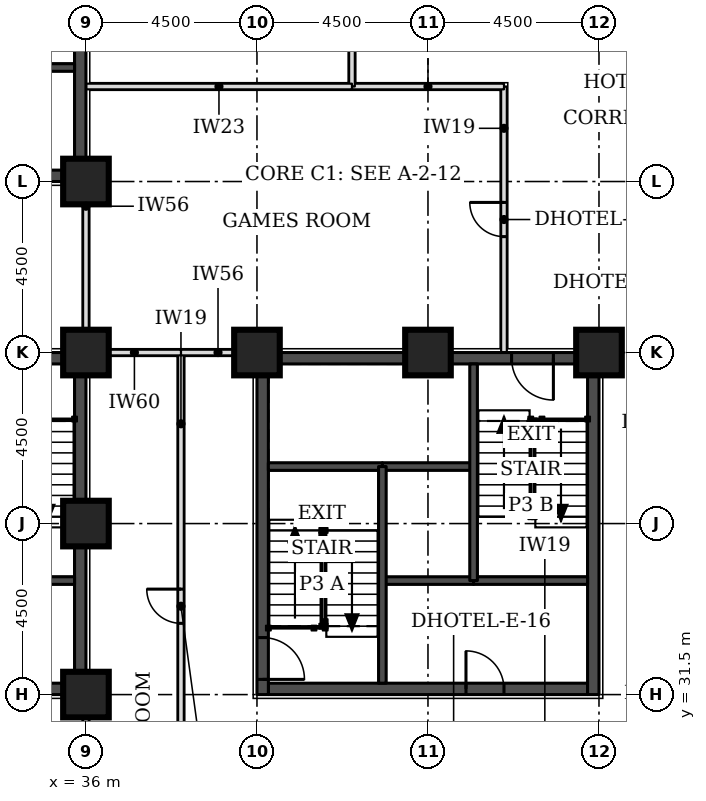
"""IFC4 building model, lengths in metres.
Left out: names, types, materials, properties, quantities, classifications, styles, units other than length and angle.
Written with IfcOpenShell. Run it as: python <this file> out.ifc"""

import sys

from ifc_helpers import new_model, si_unit, direction, frame, frame_2d, origin, origin_2d, place, context, subcontext, project, spatial, rectangle, extrude, element, fill, save


model = new_model("IFC4")
c1 = context("Model", 3, precision=1e-05, world=origin(), true_north=direction((0.0, 1.0)))
c2 = subcontext(c1, "Body", "Model", "MODEL_VIEW")
j1 = project(units=[si_unit("LENGTHUNIT", "METRE"), si_unit("PLANEANGLEUNIT", "RADIAN")], contexts=[c1])
p1 = place(None, origin())
s1 = spatial("IfcSite", under=j1, at=p1, CompositionType="ELEMENT")
p2 = place(p1, origin())
s2 = spatial("IfcBuilding", under=s1, at=p2, CompositionType="ELEMENT")
p3 = place(p2, frame((0.0, 0.0, 39.6)))
s3 = spatial("IfcBuildingStorey", under=s2, at=p3, CompositionType="ELEMENT", Elevation=39.6)
for number, where, z_axis, x_axis in (
    (1, (36.0, 31.5, 0.0), (0.0, 0.0, 1.0), (1.0, 0.0, 0.0)),
    (2, (36.0, 36.0, 0.0), (0.0, 0.0, 1.0), (1.0, 0.0, 0.0)),
    (3, (36.0, 40.5, 0.0), (0.0, 0.0, 1.0), (1.0, 0.0, 0.0)),
    (4, (40.5, 40.5, 0.0), (0.0, 0.0, 1.0), (1.0, 0.0, 0.0)),
    (5, (45.0, 40.5, 0.0), (0.0, 0.0, 1.0), (1.0, 0.0, 0.0)),
    (6, (49.5, 40.5, 0.0), (0.0, 0.0, 1.0), (1.0, 0.0, 0.0)),
    (7, (36.0, 45.0, 0.0), (0.0, 0.0, 1.0), (1.0, 0.0, 0.0)),
):
    element("IfcColumn", number, at=place(p3, frame(where, z_axis=z_axis, x_axis=x_axis)), inside=s3, PredefinedType="COLUMN", context=c2, shape_type="SweptSolid", body=[
        extrude(rectangle(XDim=1.2, YDim=1.2, at=origin_2d()), origin(), (0.0, 0.0, 1.0), 3.3),
    ])
p4 = place(p3, frame((27.3, 45.15, 0.0), z_axis=(0.0, 0.0, 1.0), x_axis=(1.0, 0.0, 0.0)))
e8 = element("IfcWall", 8, at=p4, inside=s3, PredefinedType="SHEAR", context=c2, shape_type="SweptSolid", body=[
    extrude(rectangle(XDim=8.4, YDim=0.3, at=frame_2d((4.2, 0.0))), origin(), (0.0, 0.0, 1.0), 3.3),
])
p5 = place(p4, frame((5.2, 0.0, 0.0)))
e9 = element("IfcOpeningElement", 9, at=p5, cuts=e8, PredefinedType="OPENING", context=c2, shape_type="SweptSolid", body=[
    extrude(rectangle(XDim=1.0, YDim=2.1, at=frame_2d((0.5, 1.05))), frame((0.0, 0.16, 0.0), z_axis=(0.0, -1.0, 0.0), x_axis=(1.0, 0.0, 0.0)), (0.0, 0.0, 1.0), 0.32),
])
p6 = place(p3, frame((35.85, 45.0, 0.0), z_axis=(0.0, 0.0, 1.0), x_axis=(0.0, 1.0, 0.0)))
e10 = element("IfcWall", 10, at=p6, inside=s3, PredefinedType="SHEAR", context=c2, shape_type="SweptSolid", body=[
    extrude(rectangle(XDim=9.0, YDim=0.3, at=frame_2d((4.5, 0.0))), origin(), (0.0, 0.0, 1.0), 3.3),
])
p7 = place(p3, frame((40.8, 31.65, 0.0), z_axis=(0.0, 0.0, 1.0), x_axis=(1.0, 0.0, 0.0)))
e11 = element("IfcWall", 11, at=p7, inside=s3, PredefinedType="SHEAR", context=c2, shape_type="SweptSolid", body=[
    extrude(rectangle(XDim=8.4, YDim=0.3, at=frame_2d((4.2, 0.0))), origin(), (0.0, 0.0, 1.0), 3.3),
])
p8 = place(p7, frame((5.2, 0.0, 0.0)))
e12 = element("IfcOpeningElement", 12, at=p8, cuts=e11, PredefinedType="OPENING", context=c2, shape_type="SweptSolid", body=[
    extrude(rectangle(XDim=1.0, YDim=2.1, at=frame_2d((0.5, 1.05))), frame((0.0, 0.16, 0.0), z_axis=(0.0, -1.0, 0.0), x_axis=(1.0, 0.0, 0.0)), (0.0, 0.0, 1.0), 0.32),
])
p9 = place(p3, frame((40.8, 40.35, 0.0), z_axis=(0.0, 0.0, 1.0), x_axis=(1.0, 0.0, 0.0)))
e13 = element("IfcWall", 13, at=p9, inside=s3, PredefinedType="SHEAR", context=c2, shape_type="SweptSolid", body=[
    extrude(rectangle(XDim=8.4, YDim=0.3, at=frame_2d((4.2, 0.0))), origin(), (0.0, 0.0, 1.0), 3.3),
])
p10 = place(p9, frame((6.4, 0.0, 0.0)))
e14 = element("IfcOpeningElement", 14, at=p10, cuts=e13, PredefinedType="OPENING", context=c2, shape_type="SweptSolid", body=[
    extrude(rectangle(XDim=1.1, YDim=2.1, at=frame_2d((0.55, 1.05))), frame((0.0, 0.16, 0.0), z_axis=(0.0, -1.0, 0.0), x_axis=(1.0, 0.0, 0.0)), (0.0, 0.0, 1.0), 0.32),
])
p11 = place(p3, frame((40.65, 31.5, 0.0), z_axis=(0.0, 0.0, 1.0), x_axis=(0.0, 1.0, 0.0)))
e15 = element("IfcWall", 15, at=p11, inside=s3, PredefinedType="SHEAR", context=c2, shape_type="SweptSolid", body=[
    extrude(rectangle(XDim=9.0, YDim=0.3, at=frame_2d((4.5, 0.0))), origin(), (0.0, 0.0, 1.0), 3.3),
])
p12 = place(p11, frame((0.4, 0.0, 0.0)))
e16 = element("IfcOpeningElement", 16, at=p12, cuts=e15, PredefinedType="OPENING", context=c2, shape_type="SweptSolid", body=[
    extrude(rectangle(XDim=1.1, YDim=2.1, at=frame_2d((0.55, 1.05))), frame((0.0, 0.16, 0.0), z_axis=(0.0, -1.0, 0.0), x_axis=(1.0, 0.0, 0.0)), (0.0, 0.0, 1.0), 0.32),
])
p13 = place(p3, frame((49.35, 31.5, 0.0), z_axis=(0.0, 0.0, 1.0), x_axis=(0.0, 1.0, 0.0)))
e17 = element("IfcWall", 17, at=p13, inside=s3, PredefinedType="SHEAR", context=c2, shape_type="SweptSolid", body=[
    extrude(rectangle(XDim=9.0, YDim=0.3, at=frame_2d((4.5, 0.0))), origin(), (0.0, 0.0, 1.0), 3.3),
])
p14 = place(p3, frame((27.3, 31.65, 0.0), z_axis=(0.0, 0.0, 1.0), x_axis=(1.0, 0.0, 0.0)))
e18 = element("IfcWall", 18, at=p14, inside=s3, PredefinedType="SHEAR", context=c2, shape_type="SweptSolid", body=[
    extrude(rectangle(XDim=8.4, YDim=0.3, at=frame_2d((4.2, 0.0))), origin(), (0.0, 0.0, 1.0), 3.3),
])
p15 = place(p14, frame((4.8, 0.0, 0.0)))
e19 = element("IfcOpeningElement", 19, at=p15, cuts=e18, PredefinedType="OPENING", context=c2, shape_type="SweptSolid", body=[
    extrude(rectangle(XDim=1.8, YDim=2.1, at=frame_2d((0.9, 1.05))), frame((0.0, 0.16, 0.0), z_axis=(0.0, -1.0, 0.0), x_axis=(1.0, 0.0, 0.0)), (0.0, 0.0, 1.0), 0.32),
])
p16 = place(p3, frame((27.3, 40.35, 0.0), z_axis=(0.0, 0.0, 1.0), x_axis=(1.0, 0.0, 0.0)))
e20 = element("IfcWall", 20, at=p16, inside=s3, PredefinedType="SHEAR", context=c2, shape_type="SweptSolid", body=[
    extrude(rectangle(XDim=8.4, YDim=0.3, at=frame_2d((4.2, 0.0))), origin(), (0.0, 0.0, 1.0), 3.3),
])
p17 = place(p16, frame((6.4, 0.0, 0.0)))
e21 = element("IfcOpeningElement", 21, at=p17, cuts=e20, PredefinedType="OPENING", context=c2, shape_type="SweptSolid", body=[
    extrude(rectangle(XDim=1.1, YDim=2.1, at=frame_2d((0.55, 1.05))), frame((0.0, 0.16, 0.0), z_axis=(0.0, -1.0, 0.0), x_axis=(1.0, 0.0, 0.0)), (0.0, 0.0, 1.0), 0.32),
])
p18 = place(p3, frame((35.85, 31.5, 0.0), z_axis=(0.0, 0.0, 1.0), x_axis=(0.0, 1.0, 0.0)))
e22 = element("IfcWall", 22, at=p18, inside=s3, PredefinedType="SHEAR", context=c2, shape_type="SweptSolid", body=[
    extrude(rectangle(XDim=9.0, YDim=0.3, at=frame_2d((4.5, 0.0))), origin(), (0.0, 0.0, 1.0), 3.3),
])
p19 = place(p3, frame((38.5, 27.15, 0.0), z_axis=(0.0, 0.0, 1.0), x_axis=(0.0, 1.0, 0.0)))
e23 = element("IfcWall", 23, at=p19, inside=s3, PredefinedType="PARTITIONING", context=c2, shape_type="SweptSolid", body=[
    extrude(rectangle(XDim=13.35, YDim=0.15, at=frame_2d((6.675, 0.0))), origin(), (0.0, 0.0, 1.0), 3.08),
])
p20 = place(p19, frame((6.225, 0.0, 0.0)))
e24 = element("IfcOpeningElement", 24, at=p20, cuts=e23, PredefinedType="OPENING", context=c2, shape_type="SweptSolid", body=[
    extrude(rectangle(XDim=0.9, YDim=2.1, at=frame_2d((0.45, 1.05))), frame((0.0, 0.085, 0.0), z_axis=(0.0, -1.0, 0.0), x_axis=(1.0, 0.0, 0.0)), (0.0, 0.0, 1.0), 0.17),
])
for number, where, z_axis, x_axis in (
    (25, (36.0, 29.5, 0.0), (0.0, 0.0, 1.0), (0.0, 1.0, 0.0)),
    (26, (38.5, 40.5, 0.0), (0.0, 0.0, 1.0), (1.0, 0.0, 0.0)),
):
    element("IfcWall", number, at=place(p3, frame(where, z_axis=z_axis, x_axis=x_axis)), inside=s3, PredefinedType="PARTITIONING", context=c2, shape_type="SweptSolid", body=[
        extrude(rectangle(XDim=1.95, YDim=0.15, at=frame_2d((0.975, 0.0))), origin(), (0.0, 0.0, 1.0), 2.33),
    ])
p21 = place(p3, frame((36.0, 40.55, 0.0), z_axis=(0.0, 0.0, 1.0), x_axis=(0.0, 1.0, 0.0)))
e27 = element("IfcWall", 27, at=p21, inside=s3, PredefinedType="PARTITIONING", context=c2, shape_type="SweptSolid", body=[
    extrude(rectangle(XDim=4.4, YDim=0.15, at=frame_2d((2.2, 0.0))), origin(), (0.0, 0.0, 1.0), 2.33),
])
p22 = place(p3, frame((47.0, 40.5, 0.0), z_axis=(0.0, 0.0, 1.0), x_axis=(0.0, 1.0, 0.0)))
e28 = element("IfcWall", 28, at=p22, inside=s3, PredefinedType="PARTITIONING", context=c2, shape_type="SweptSolid", body=[
    extrude(rectangle(XDim=7.0, YDim=0.15, at=frame_2d((3.5, 0.0))), origin(), (0.0, 0.0, 1.0), 3.08),
])
p23 = place(p22, frame((3.05, 0.0, 0.0)))
e29 = element("IfcOpeningElement", 29, at=p23, cuts=e28, PredefinedType="OPENING", context=c2, shape_type="SweptSolid", body=[
    extrude(rectangle(XDim=0.9, YDim=2.1, at=frame_2d((0.45, 1.05))), frame((0.0, 0.085, 0.0), z_axis=(0.0, -1.0, 0.0), x_axis=(1.0, 0.0, 0.0)), (0.0, 0.0, 1.0), 0.17),
])
p24 = place(p3, frame((43.0, 47.5, 0.0), z_axis=(0.0, 0.0, 1.0), x_axis=(1.0, 0.0, 0.0)))
e30 = element("IfcWall", 30, at=p24, inside=s3, PredefinedType="PARTITIONING", context=c2, shape_type="SweptSolid", body=[
    extrude(rectangle(XDim=4.0, YDim=0.15, at=frame_2d((2.0, 0.0))), origin(), (0.0, 0.0, 1.0), 3.08),
])
p25 = place(p3, frame((43.0, 47.5, 0.0), z_axis=(0.0, 0.0, 1.0), x_axis=(0.0, 1.0, 0.0)))
e31 = element("IfcWall", 31, at=p25, inside=s3, PredefinedType="PARTITIONING", context=c2, shape_type="SweptSolid", body=[
    extrude(rectangle(XDim=7.85, YDim=0.15, at=frame_2d((3.925, 0.0))), origin(), (0.0, 0.0, 1.0), 3.08),
])
p26 = place(p25, frame((3.475, 0.0, 0.0)))
e32 = element("IfcOpeningElement", 32, at=p26, cuts=e31, PredefinedType="OPENING", context=c2, shape_type="SweptSolid", body=[
    extrude(rectangle(XDim=0.9, YDim=2.1, at=frame_2d((0.45, 1.05))), frame((0.0, 0.085, 0.0), z_axis=(0.0, -1.0, 0.0), x_axis=(1.0, 0.0, 0.0)), (0.0, 0.0, 1.0), 0.17),
])
p27 = place(p3, frame((36.05, 40.5, 0.0), z_axis=(0.0, 0.0, 1.0), x_axis=(1.0, 0.0, 0.0)))
e33 = element("IfcWall", 33, at=p27, inside=s3, PredefinedType="PARTITIONING", context=c2, shape_type="SweptSolid", body=[
    extrude(rectangle(XDim=2.45, YDim=0.15, at=frame_2d((1.225, 0.0))), origin(), (0.0, 0.0, 1.0), 2.33),
])
p28 = place(p3, frame((36.0, 47.5, 0.0), z_axis=(0.0, 0.0, 1.0), x_axis=(1.0, 0.0, 0.0)))
e34 = element("IfcWall", 34, at=p28, inside=s3, PredefinedType="PARTITIONING", context=c2, shape_type="SweptSolid", body=[
    extrude(rectangle(XDim=7.0, YDim=0.15, at=frame_2d((3.5, 0.0))), origin(), (0.0, 0.0, 1.0), 3.08),
])
p29 = place(p3, frame((32.7, 48.0, 0.0), z_axis=(0.0, 0.0, 1.0), x_axis=(1.0, 0.0, 0.0)))
e35 = element("IfcWall", 35, at=p29, inside=s3, PredefinedType="SOLIDWALL", context=c2, shape_type="SweptSolid", body=[
    extrude(rectangle(XDim=3.0, YDim=0.2, at=frame_2d((1.5, 0.0))), origin(), (0.0, 0.0, 1.0), 3.08),
])
p30 = place(p3, frame((43.8, 34.5, 0.0), z_axis=(0.0, 0.0, 1.0), x_axis=(1.0, 0.0, 0.0)))
e36 = element("IfcWall", 36, at=p30, inside=s3, PredefinedType="SOLIDWALL", context=c2, shape_type="SweptSolid", body=[
    extrude(rectangle(XDim=2.4, YDim=0.2, at=frame_2d((1.2, 0.0))), origin(), (0.0, 0.0, 1.0), 3.08),
])
p31 = place(p3, frame((46.2, 34.5, 0.0), z_axis=(0.0, 0.0, 1.0), x_axis=(1.0, 0.0, 0.0)))
e37 = element("IfcWall", 37, at=p31, inside=s3, PredefinedType="SOLIDWALL", context=c2, shape_type="SweptSolid", body=[
    extrude(rectangle(XDim=3.0, YDim=0.2, at=frame_2d((1.5, 0.0))), origin(), (0.0, 0.0, 1.0), 3.08),
])
p32 = place(p3, frame((43.8, 37.5, 0.0), z_axis=(0.0, 0.0, 1.0), x_axis=(1.0, 0.0, 0.0)))
e38 = element("IfcWall", 38, at=p32, inside=s3, PredefinedType="SOLIDWALL", context=c2, shape_type="SweptSolid", body=[
    extrude(rectangle(XDim=2.4, YDim=0.2, at=frame_2d((1.2, 0.0))), origin(), (0.0, 0.0, 1.0), 3.3),
])
p33 = place(p3, frame((40.8, 37.5, 0.0), z_axis=(0.0, 0.0, 1.0), x_axis=(1.0, 0.0, 0.0)))
e39 = element("IfcWall", 39, at=p33, inside=s3, PredefinedType="SOLIDWALL", context=c2, shape_type="SweptSolid", body=[
    extrude(rectangle(XDim=3.0, YDim=0.2, at=frame_2d((1.5, 0.0))), origin(), (0.0, 0.0, 1.0), 3.08),
])
for number, where, z_axis, x_axis in (
    (40, (43.8, 31.8, 0.0), (0.0, 0.0, 1.0), (0.0, 1.0, 0.0)),
    (41, (46.2, 34.5, 0.0), (0.0, 0.0, 1.0), (0.0, 1.0, 0.0)),
):
    element("IfcWall", number, at=place(p3, frame(where, z_axis=z_axis, x_axis=x_axis)), inside=s3, PredefinedType="SOLIDWALL", context=c2, shape_type="SweptSolid", body=[
        extrude(rectangle(XDim=5.7, YDim=0.2, at=frame_2d((2.85, 0.0))), origin(), (0.0, 0.0, 1.0), 3.08),
    ])
p34 = place(p3, frame((30.3, 34.5, 0.0), z_axis=(0.0, 0.0, 1.0), x_axis=(1.0, 0.0, 0.0)))
e42 = element("IfcWall", 42, at=p34, inside=s3, PredefinedType="SOLIDWALL", context=c2, shape_type="SweptSolid", body=[
    extrude(rectangle(XDim=5.4, YDim=0.2, at=frame_2d((2.7, 0.0))), origin(), (0.0, 0.0, 1.0), 3.08),
])
p35 = place(p34, frame((0.45, 0.0, 0.0)))
e43 = element("IfcOpeningElement", 43, at=p35, cuts=e42, PredefinedType="OPENING", context=c2, shape_type="SweptSolid", body=[
    extrude(rectangle(XDim=1.5, YDim=2.1, at=frame_2d((0.75, 1.05))), frame((0.0, 0.11, 0.0), z_axis=(0.0, -1.0, 0.0), x_axis=(1.0, 0.0, 0.0)), (0.0, 0.0, 1.0), 0.22),
])
p36 = place(p20, origin())
e44 = element("IfcDoor", 44, at=p36, inside=s3, OperationType="SINGLE_SWING_RIGHT", PredefinedType="DOOR", context=c2, shape_type="SweptSolid", body=[
    extrude(rectangle(XDim=0.9, YDim=2.1, at=frame_2d((0.45, 1.05))), frame((0.0, 0.025, 0.0), z_axis=(0.0, -1.0, 0.0), x_axis=(1.0, 0.0, 0.0)), (0.0, 0.0, 1.0), 0.05),
])
fill(e24, e44)
p37 = place(p23, origin())
e45 = element("IfcDoor", 45, at=p37, inside=s3, OperationType="SINGLE_SWING_RIGHT", PredefinedType="DOOR", context=c2, shape_type="SweptSolid", body=[
    extrude(rectangle(XDim=0.9, YDim=2.1, at=frame_2d((0.45, 1.05))), frame((0.0, 0.025, 0.0), z_axis=(0.0, -1.0, 0.0), x_axis=(1.0, 0.0, 0.0)), (0.0, 0.0, 1.0), 0.05),
])
fill(e29, e45)
p38 = place(p12, frame((1.1, 0.0, 0.0), z_axis=(0.0, 0.0, 1.0), x_axis=(-1.0, 0.0, 0.0)))
e46 = element("IfcDoor", 46, at=p38, inside=s3, OperationType="SINGLE_SWING_RIGHT", PredefinedType="DOOR", context=c2, shape_type="SweptSolid", body=[
    extrude(rectangle(XDim=1.1, YDim=2.1, at=frame_2d((0.55, 1.05))), frame((0.0, 0.025, 0.0), z_axis=(0.0, -1.0, 0.0), x_axis=(1.0, 0.0, 0.0)), (0.0, 0.0, 1.0), 0.05),
])
fill(e16, e46)
p39 = place(p10, frame((1.1, 0.0, 0.0), z_axis=(0.0, 0.0, 1.0), x_axis=(-1.0, 0.0, 0.0)))
e47 = element("IfcDoor", 47, at=p39, inside=s3, OperationType="SINGLE_SWING_LEFT", PredefinedType="DOOR", context=c2, shape_type="SweptSolid", body=[
    extrude(rectangle(XDim=1.1, YDim=2.1, at=frame_2d((0.55, 1.05))), frame((0.0, 0.025, 0.0), z_axis=(0.0, -1.0, 0.0), x_axis=(1.0, 0.0, 0.0)), (0.0, 0.0, 1.0), 0.05),
])
fill(e14, e47)
p40 = place(p8, origin())
e48 = element("IfcDoor", 48, at=p40, inside=s3, OperationType="SINGLE_SWING_LEFT", PredefinedType="DOOR", context=c2, shape_type="SweptSolid", body=[
    extrude(rectangle(XDim=1.0, YDim=2.1, at=frame_2d((0.5, 1.05))), frame((0.0, 0.025, 0.0), z_axis=(0.0, -1.0, 0.0), x_axis=(1.0, 0.0, 0.0)), (0.0, 0.0, 1.0), 0.05),
])
fill(e12, e48)
save(model, sys.argv[1])
